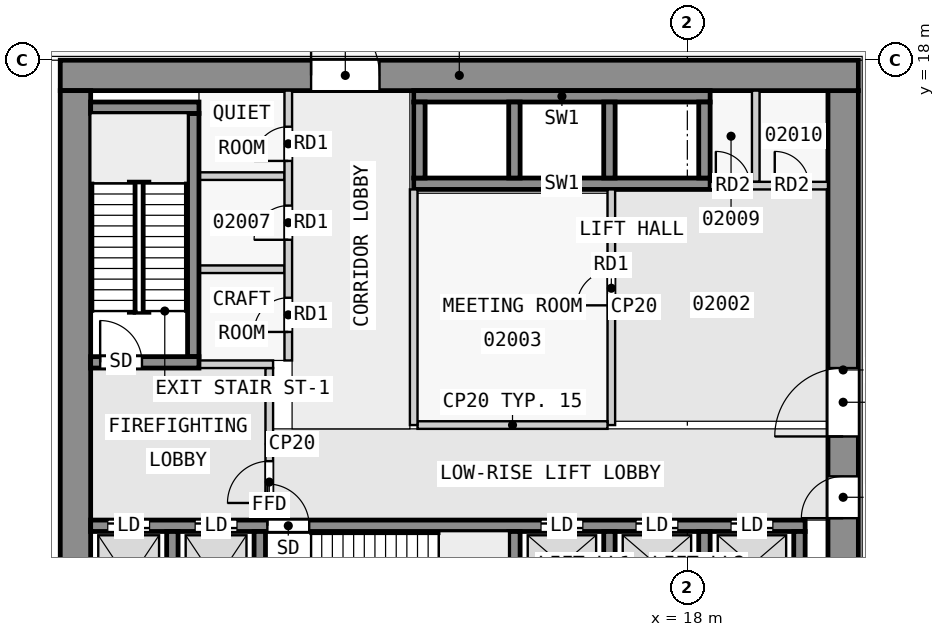
"""IFC4 building model, lengths in metres.
Left out: names, types, materials, properties, quantities, classifications, styles, units other than length and angle.
Written with IfcOpenShell. Run it as: python <this file> out.ifc"""

import sys

from ifc_helpers import new_model, si_unit, direction, frame, frame_2d, origin, place, context, subcontext, project, spatial, rectangle, extrude, element, fill, save


model = new_model("IFC4")
c1 = context("Model", 3, precision=1e-05, world=origin(), true_north=direction((0.0, 1.0)))
c2 = subcontext(c1, "Body", "Model", "MODEL_VIEW")
j1 = project(units=[si_unit("LENGTHUNIT", "METRE"), si_unit("PLANEANGLEUNIT", "RADIAN")], contexts=[c1])
p1 = place(None, origin())
s1 = spatial("IfcSite", under=j1, at=p1, CompositionType="ELEMENT")
p2 = place(p1, origin())
s2 = spatial("IfcBuilding", under=s1, at=p2, CompositionType="ELEMENT")
p3 = place(p2, frame((0.0, 0.0, 12.8)))
s3 = spatial("IfcBuildingStorey", under=s2, at=p3, CompositionType="ELEMENT", Elevation=12.8)
p4 = place(p3, frame((1.5, 17.6, 0.0), z_axis=(0.0, 0.0, 1.0), x_axis=(1.0, 0.0, 0.0)))
e1 = element("IfcWall", 1, at=p4, inside=s3, PredefinedType="SHEAR", context=c2, shape_type="SweptSolid", body=[
    extrude(rectangle(XDim=21.0, YDim=0.8, at=frame_2d((10.5, 0.0))), origin(), (0.0, 0.0, 1.0), 4.15),
])
p5 = place(p4, frame((6.6, 0.0, 0.0)))
e2 = element("IfcOpeningElement", 2, at=p5, cuts=e1, PredefinedType="OPENING", context=c2, shape_type="SweptSolid", body=[
    extrude(rectangle(XDim=1.8, YDim=2.1, at=frame_2d((0.9, 1.05))), frame((0.0, 0.41, 0.0), z_axis=(0.0, -1.0, 0.0), x_axis=(1.0, 0.0, 0.0)), (0.0, 0.0, 1.0), 0.82),
])
p6 = place(p3, frame((1.9, 2.5, 0.0), z_axis=(0.0, 0.0, 1.0), x_axis=(0.0, 1.0, 0.0)))
e3 = element("IfcWall", 3, at=p6, inside=s3, PredefinedType="SHEAR", context=c2, shape_type="SweptSolid", body=[
    extrude(rectangle(XDim=14.7, YDim=0.8, at=frame_2d((7.35, 0.0))), origin(), (0.0, 0.0, 1.0), 4.15),
])
p7 = place(p3, frame((22.1, 2.5, 0.0), z_axis=(0.0, 0.0, 1.0), x_axis=(0.0, 1.0, 0.0)))
e4 = element("IfcWall", 4, at=p7, inside=s3, PredefinedType="SHEAR", context=c2, shape_type="SweptSolid", body=[
    extrude(rectangle(XDim=14.7, YDim=0.8, at=frame_2d((7.35, 0.0))), origin(), (0.0, 0.0, 1.0), 4.15),
])
p8 = place(p7, frame((5.6, 0.0, 0.0)))
e5 = element("IfcOpeningElement", 5, at=p8, cuts=e4, PredefinedType="OPENING", context=c2, shape_type="SweptSolid", body=[
    extrude(rectangle(XDim=1.8, YDim=2.1, at=frame_2d((0.9, 1.05))), frame((0.0, 0.41, 0.0), z_axis=(0.0, -1.0, 0.0), x_axis=(1.0, 0.0, 0.0)), (0.0, 0.0, 1.0), 0.82),
])
p9 = place(p7, frame((3.45, 0.0, 0.0)))
e6 = element("IfcOpeningElement", 6, at=p9, cuts=e4, PredefinedType="OPENING", context=c2, shape_type="SweptSolid", body=[
    extrude(rectangle(XDim=1.1, YDim=2.1, at=frame_2d((0.55, 1.05))), frame((0.0, 0.41, 0.0), z_axis=(0.0, -1.0, 0.0), x_axis=(1.0, 0.0, 0.0)), (0.0, 0.0, 1.0), 0.82),
])
for number, where, z_axis, x_axis in (
    (7, (4.45, 2.8, 0.0), (0.0, 0.0, 1.0), (0.0, 1.0, 0.0)),
    (8, (6.75, 2.8, 0.0), (0.0, 0.0, 1.0), (0.0, 1.0, 0.0)),
    (9, (13.45, 2.8, 0.0), (0.0, 0.0, 1.0), (0.0, 1.0, 0.0)),
    (10, (15.95, 2.8, 0.0), (0.0, 0.0, 1.0), (0.0, 1.0, 0.0)),
    (11, (18.45, 2.8, 0.0), (0.0, 0.0, 1.0), (0.0, 1.0, 0.0)),
    (12, (20.95, 2.8, 0.0), (0.0, 0.0, 1.0), (0.0, 1.0, 0.0)),
):
    element("IfcWall", number, at=place(p3, frame(where, z_axis=z_axis, x_axis=x_axis)), inside=s3, PredefinedType="SHEAR", context=c2, shape_type="SweptSolid", body=[
        extrude(rectangle(XDim=2.8, YDim=0.3, at=frame_2d((1.4, 0.0))), origin(), (0.0, 0.0, 1.0), 4.15),
    ])
p10 = place(p3, frame((2.3, 5.75, 0.0), z_axis=(0.0, 0.0, 1.0), x_axis=(1.0, 0.0, 0.0)))
e13 = element("IfcWall", 13, at=p10, inside=s3, PredefinedType="SHEAR", context=c2, shape_type="SweptSolid", body=[
    extrude(rectangle(XDim=18.8, YDim=0.3, at=frame_2d((9.4, 0.0))), origin(), (0.0, 0.0, 1.0), 4.15),
])
p11 = place(p10, frame((4.65, 0.0, 0.0)))
e14 = element("IfcOpeningElement", 14, at=p11, cuts=e13, PredefinedType="OPENING", context=c2, shape_type="SweptSolid", body=[
    extrude(rectangle(XDim=1.1, YDim=2.1, at=frame_2d((0.55, 1.05))), frame((0.0, 0.16, 0.0), z_axis=(0.0, -1.0, 0.0), x_axis=(1.0, 0.0, 0.0)), (0.0, 0.0, 1.0), 0.32),
])
p12 = place(p10, frame((0.45, 0.0, 0.0)))
e15 = element("IfcOpeningElement", 15, at=p12, cuts=e13, PredefinedType="OPENING", context=c2, shape_type="SweptSolid", body=[
    extrude(rectangle(XDim=1.1, YDim=2.1, at=frame_2d((0.55, 1.05))), frame((0.0, 0.16, 0.0), z_axis=(0.0, -1.0, 0.0), x_axis=(1.0, 0.0, 0.0)), (0.0, 0.0, 1.0), 0.32),
])
p13 = place(p10, frame((2.75, 0.0, 0.0)))
e16 = element("IfcOpeningElement", 16, at=p13, cuts=e13, PredefinedType="OPENING", context=c2, shape_type="SweptSolid", body=[
    extrude(rectangle(XDim=1.1, YDim=2.1, at=frame_2d((0.55, 1.05))), frame((0.0, 0.16, 0.0), z_axis=(0.0, -1.0, 0.0), x_axis=(1.0, 0.0, 0.0)), (0.0, 0.0, 1.0), 0.32),
])
p14 = place(p10, frame((11.85, 0.0, 0.0)))
e17 = element("IfcOpeningElement", 17, at=p14, cuts=e13, PredefinedType="OPENING", context=c2, shape_type="SweptSolid", body=[
    extrude(rectangle(XDim=1.1, YDim=2.1, at=frame_2d((0.55, 1.05))), frame((0.0, 0.16, 0.0), z_axis=(0.0, -1.0, 0.0), x_axis=(1.0, 0.0, 0.0)), (0.0, 0.0, 1.0), 0.32),
])
p15 = place(p10, frame((14.35, 0.0, 0.0)))
e18 = element("IfcOpeningElement", 18, at=p15, cuts=e13, PredefinedType="OPENING", context=c2, shape_type="SweptSolid", body=[
    extrude(rectangle(XDim=1.1, YDim=2.1, at=frame_2d((0.55, 1.05))), frame((0.0, 0.16, 0.0), z_axis=(0.0, -1.0, 0.0), x_axis=(1.0, 0.0, 0.0)), (0.0, 0.0, 1.0), 0.32),
])
p16 = place(p10, frame((16.85, 0.0, 0.0)))
e19 = element("IfcOpeningElement", 19, at=p16, cuts=e13, PredefinedType="OPENING", context=c2, shape_type="SweptSolid", body=[
    extrude(rectangle(XDim=1.1, YDim=2.1, at=frame_2d((0.55, 1.05))), frame((0.0, 0.16, 0.0), z_axis=(0.0, -1.0, 0.0), x_axis=(1.0, 0.0, 0.0)), (0.0, 0.0, 1.0), 0.32),
])
p17 = place(p3, frame((2.3, 10.05, 0.0), z_axis=(0.0, 0.0, 1.0), x_axis=(1.0, 0.0, 0.0)))
e20 = element("IfcWall", 20, at=p17, inside=s3, PredefinedType="SHEAR", context=c2, shape_type="SweptSolid", body=[
    extrude(rectangle(XDim=2.85, YDim=0.3, at=frame_2d((1.425, 0.0))), origin(), (0.0, 0.0, 1.0), 4.15),
])
p18 = place(p17, frame((0.25, 0.0, 0.0)))
e21 = element("IfcOpeningElement", 21, at=p18, cuts=e20, PredefinedType="OPENING", context=c2, shape_type="SweptSolid", body=[
    extrude(rectangle(XDim=1.1, YDim=2.1, at=frame_2d((0.55, 1.05))), frame((0.0, 0.16, 0.0), z_axis=(0.0, -1.0, 0.0), x_axis=(1.0, 0.0, 0.0)), (0.0, 0.0, 1.0), 0.32),
])
p19 = place(p3, frame((5.0, 10.2, 0.0), z_axis=(0.0, 0.0, 1.0), x_axis=(0.0, 1.0, 0.0)))
e22 = element("IfcWall", 22, at=p19, inside=s3, PredefinedType="SHEAR", context=c2, shape_type="SweptSolid", body=[
    extrude(rectangle(XDim=6.4, YDim=0.3, at=frame_2d((3.2, 0.0))), origin(), (0.0, 0.0, 1.0), 4.15),
])
p20 = place(p3, frame((2.3, 16.75, 0.0), z_axis=(0.0, 0.0, 1.0), x_axis=(1.0, 0.0, 0.0)))
e23 = element("IfcWall", 23, at=p20, inside=s3, PredefinedType="SHEAR", context=c2, shape_type="SweptSolid", body=[
    extrude(rectangle(XDim=2.85, YDim=0.3, at=frame_2d((1.425, 0.0))), origin(), (0.0, 0.0, 1.0), 4.15),
])
for number, where, z_axis, x_axis in (
    (24, (10.8, 17.05, 0.0), (0.0, 0.0, 1.0), (1.0, 0.0, 0.0)),
    (25, (10.8, 14.75, 0.0), (0.0, 0.0, 1.0), (1.0, 0.0, 0.0)),
):
    element("IfcWall", number, at=place(p3, frame(where, z_axis=z_axis, x_axis=x_axis)), inside=s3, PredefinedType="SHEAR", context=c2, shape_type="SweptSolid", body=[
        extrude(rectangle(XDim=7.8, YDim=0.3, at=frame_2d((3.9, 0.0))), origin(), (0.0, 0.0, 1.0), 4.15),
    ])
for number, where, z_axis, x_axis in (
    (26, (10.95, 14.9, 0.0), (0.0, 0.0, 1.0), (0.0, 1.0, 0.0)),
    (27, (13.45, 14.9, 0.0), (0.0, 0.0, 1.0), (0.0, 1.0, 0.0)),
    (28, (15.95, 14.9, 0.0), (0.0, 0.0, 1.0), (0.0, 1.0, 0.0)),
    (29, (18.45, 14.9, 0.0), (0.0, 0.0, 1.0), (0.0, 1.0, 0.0)),
):
    element("IfcWall", number, at=place(p3, frame(where, z_axis=z_axis, x_axis=x_axis)), inside=s3, PredefinedType="SHEAR", context=c2, shape_type="SweptSolid", body=[
        extrude(rectangle(XDim=2.0, YDim=0.3, at=frame_2d((1.0, 0.0))), origin(), (0.0, 0.0, 1.0), 4.15),
    ])
p21 = place(p3, frame((7.0, 5.9, 0.0), z_axis=(0.0, 0.0, 1.0), x_axis=(0.0, 1.0, 0.0)))
e30 = element("IfcWall", 30, at=p21, inside=s3, PredefinedType="PARTITIONING", context=c2, shape_type="SweptSolid", body=[
    extrude(rectangle(XDim=4.0, YDim=0.2, at=frame_2d((2.0, 0.0))), origin(), (0.0, 0.0, 1.0), 4.15),
])
p22 = place(p21, frame((0.45, 0.0, 0.0)))
e31 = element("IfcOpeningElement", 31, at=p22, cuts=e30, PredefinedType="OPENING", context=c2, shape_type="SweptSolid", body=[
    extrude(rectangle(XDim=1.1, YDim=2.1, at=frame_2d((0.55, 1.05))), frame((0.0, 0.11, 0.0), z_axis=(0.0, -1.0, 0.0), x_axis=(1.0, 0.0, 0.0)), (0.0, 0.0, 1.0), 0.22),
])
p23 = place(p3, frame((5.15, 10.0, 0.0), z_axis=(0.0, 0.0, 1.0), x_axis=(1.0, 0.0, 0.0)))
e32 = element("IfcWall", 32, at=p23, inside=s3, PredefinedType="PARTITIONING", context=c2, shape_type="SweptSolid", body=[
    extrude(rectangle(XDim=1.95, YDim=0.2, at=frame_2d((0.975, 0.0))), origin(), (0.0, 0.0, 1.0), 4.15),
])
p24 = place(p3, frame((10.8, 8.4, 0.0), z_axis=(0.0, 0.0, 1.0), x_axis=(0.0, 1.0, 0.0)))
e33 = element("IfcWall", 33, at=p24, inside=s3, PredefinedType="PARTITIONING", context=c2, shape_type="SweptSolid", body=[
    extrude(rectangle(XDim=6.2, YDim=0.2, at=frame_2d((3.1, 0.0))), origin(), (0.0, 0.0, 1.0), 4.15),
])
p25 = place(p3, frame((10.9, 8.4, 0.0), z_axis=(0.0, 0.0, 1.0), x_axis=(1.0, 0.0, 0.0)))
e34 = element("IfcWall", 34, at=p25, inside=s3, PredefinedType="PARTITIONING", context=c2, shape_type="SweptSolid", body=[
    extrude(rectangle(XDim=5.0, YDim=0.2, at=frame_2d((2.5, 0.0))), origin(), (0.0, 0.0, 1.0), 4.15),
])
p26 = place(p3, frame((16.0, 8.4, 0.0), z_axis=(0.0, 0.0, 1.0), x_axis=(0.0, 1.0, 0.0)))
e35 = element("IfcWall", 35, at=p26, inside=s3, PredefinedType="PARTITIONING", context=c2, shape_type="SweptSolid", body=[
    extrude(rectangle(XDim=6.2, YDim=0.2, at=frame_2d((3.1, 0.0))), origin(), (0.0, 0.0, 1.0), 4.15),
])
p27 = place(p26, frame((3.15, 0.0, 0.0)))
e36 = element("IfcOpeningElement", 36, at=p27, cuts=e35, PredefinedType="OPENING", context=c2, shape_type="SweptSolid", body=[
    extrude(rectangle(XDim=0.9, YDim=2.1, at=frame_2d((0.45, 1.05))), frame((0.0, 0.11, 0.0), z_axis=(0.0, -1.0, 0.0), x_axis=(1.0, 0.0, 0.0)), (0.0, 0.0, 1.0), 0.22),
])
p28 = place(p3, frame((7.5, 10.1, 0.0), z_axis=(0.0, 0.0, 1.0), x_axis=(0.0, 1.0, 0.0)))
e37 = element("IfcWall", 37, at=p28, inside=s3, PredefinedType="PARTITIONING", context=c2, shape_type="SweptSolid", body=[
    extrude(rectangle(XDim=7.1, YDim=0.2, at=frame_2d((3.55, 0.0))), origin(), (0.0, 0.0, 1.0), 4.15),
])
p29 = place(p28, frame((0.75, 0.0, 0.0)))
e38 = element("IfcOpeningElement", 38, at=p29, cuts=e37, PredefinedType="OPENING", context=c2, shape_type="SweptSolid", body=[
    extrude(rectangle(XDim=0.9, YDim=2.1, at=frame_2d((0.45, 1.05))), frame((0.0, 0.11, 0.0), z_axis=(0.0, -1.0, 0.0), x_axis=(1.0, 0.0, 0.0)), (0.0, 0.0, 1.0), 0.22),
])
p30 = place(p28, frame((3.175, 0.0, 0.0)))
e39 = element("IfcOpeningElement", 39, at=p30, cuts=e37, PredefinedType="OPENING", context=c2, shape_type="SweptSolid", body=[
    extrude(rectangle(XDim=0.9, YDim=2.1, at=frame_2d((0.45, 1.05))), frame((0.0, 0.11, 0.0), z_axis=(0.0, -1.0, 0.0), x_axis=(1.0, 0.0, 0.0)), (0.0, 0.0, 1.0), 0.22),
])
p31 = place(p28, frame((5.25, 0.0, 0.0)))
e40 = element("IfcOpeningElement", 40, at=p31, cuts=e37, PredefinedType="OPENING", context=c2, shape_type="SweptSolid", body=[
    extrude(rectangle(XDim=0.9, YDim=2.1, at=frame_2d((0.45, 1.05))), frame((0.0, 0.11, 0.0), z_axis=(0.0, -1.0, 0.0), x_axis=(1.0, 0.0, 0.0)), (0.0, 0.0, 1.0), 0.22),
])
for number, where, z_axis, x_axis in (
    (41, (5.15, 12.5, 0.0), (0.0, 0.0, 1.0), (1.0, 0.0, 0.0)),
    (42, (5.15, 14.95, 0.0), (0.0, 0.0, 1.0), (1.0, 0.0, 0.0)),
):
    element("IfcWall", number, at=place(p3, frame(where, z_axis=z_axis, x_axis=x_axis)), inside=s3, PredefinedType="PARTITIONING", context=c2, shape_type="SweptSolid", body=[
        extrude(rectangle(XDim=2.25, YDim=0.2, at=frame_2d((1.125, 0.0))), origin(), (0.0, 0.0, 1.0), 4.15),
    ])
p32 = place(p3, frame((18.6, 14.7, 0.0), z_axis=(0.0, 0.0, 1.0), x_axis=(1.0, 0.0, 0.0)))
e43 = element("IfcWall", 43, at=p32, inside=s3, PredefinedType="PARTITIONING", context=c2, shape_type="SweptSolid", body=[
    extrude(rectangle(XDim=3.1, YDim=0.2, at=frame_2d((1.55, 0.0))), origin(), (0.0, 0.0, 1.0), 4.15),
])
p33 = place(p32, frame((0.15, 0.0, 0.0)))
e44 = element("IfcOpeningElement", 44, at=p33, cuts=e43, PredefinedType="OPENING", context=c2, shape_type="SweptSolid", body=[
    extrude(rectangle(XDim=0.9, YDim=2.1, at=frame_2d((0.45, 1.05))), frame((0.0, 0.11, 0.0), z_axis=(0.0, -1.0, 0.0), x_axis=(1.0, 0.0, 0.0)), (0.0, 0.0, 1.0), 0.22),
])
p34 = place(p32, frame((1.7, 0.0, 0.0)))
e45 = element("IfcOpeningElement", 45, at=p34, cuts=e43, PredefinedType="OPENING", context=c2, shape_type="SweptSolid", body=[
    extrude(rectangle(XDim=0.9, YDim=2.1, at=frame_2d((0.45, 1.05))), frame((0.0, 0.11, 0.0), z_axis=(0.0, -1.0, 0.0), x_axis=(1.0, 0.0, 0.0)), (0.0, 0.0, 1.0), 0.22),
])
p35 = place(p3, frame((19.8, 14.8, 0.0), z_axis=(0.0, 0.0, 1.0), x_axis=(0.0, 1.0, 0.0)))
e46 = element("IfcWall", 46, at=p35, inside=s3, PredefinedType="PARTITIONING", context=c2, shape_type="SweptSolid", body=[
    extrude(rectangle(XDim=2.4, YDim=0.2, at=frame_2d((1.2, 0.0))), origin(), (0.0, 0.0, 1.0), 4.15),
])
p36 = place(p22, origin())
e47 = element("IfcDoor", 47, at=p36, inside=s3, OperationType="SINGLE_SWING_LEFT", PredefinedType="DOOR", context=c2, shape_type="SweptSolid", body=[
    extrude(rectangle(XDim=1.1, YDim=2.1, at=frame_2d((0.55, 1.05))), frame((0.0, 0.025, 0.0), z_axis=(0.0, -1.0, 0.0), x_axis=(1.0, 0.0, 0.0)), (0.0, 0.0, 1.0), 0.05),
])
fill(e31, e47)
p37 = place(p18, origin())
e48 = element("IfcDoor", 48, at=p37, inside=s3, OperationType="SINGLE_SWING_RIGHT", PredefinedType="DOOR", context=c2, shape_type="SweptSolid", body=[
    extrude(rectangle(XDim=1.1, YDim=2.1, at=frame_2d((0.55, 1.05))), frame((0.0, 0.025, 0.0), z_axis=(0.0, -1.0, 0.0), x_axis=(1.0, 0.0, 0.0)), (0.0, 0.0, 1.0), 0.05),
])
fill(e21, e48)
p38 = place(p27, origin())
e49 = element("IfcDoor", 49, at=p38, inside=s3, OperationType="SINGLE_SWING_LEFT", PredefinedType="DOOR", context=c2, shape_type="SweptSolid", body=[
    extrude(rectangle(XDim=0.9, YDim=2.1, at=frame_2d((0.45, 1.05))), frame((0.0, 0.025, 0.0), z_axis=(0.0, -1.0, 0.0), x_axis=(1.0, 0.0, 0.0)), (0.0, 0.0, 1.0), 0.05),
])
fill(e36, e49)
p39 = place(p11, origin())
e50 = element("IfcDoor", 50, at=p39, inside=s3, OperationType="SINGLE_SWING_LEFT", PredefinedType="DOOR", context=c2, shape_type="SweptSolid", body=[
    extrude(rectangle(XDim=1.1, YDim=2.1, at=frame_2d((0.55, 1.05))), frame((0.0, 0.025, 0.0), z_axis=(0.0, -1.0, 0.0), x_axis=(1.0, 0.0, 0.0)), (0.0, 0.0, 1.0), 0.05),
])
fill(e14, e50)
p40 = place(p12, origin())
e51 = element("IfcDoor", 51, at=p40, inside=s3, OperationType="DOUBLE_DOOR_SLIDING", PredefinedType="DOOR", context=c2, shape_type="SweptSolid", body=[
    extrude(rectangle(XDim=1.1, YDim=2.1, at=frame_2d((0.55, 1.05))), frame((0.0, 0.025, 0.0), z_axis=(0.0, -1.0, 0.0), x_axis=(1.0, 0.0, 0.0)), (0.0, 0.0, 1.0), 0.05),
])
fill(e15, e51)
p41 = place(p13, origin())
e52 = element("IfcDoor", 52, at=p41, inside=s3, OperationType="DOUBLE_DOOR_SLIDING", PredefinedType="DOOR", context=c2, shape_type="SweptSolid", body=[
    extrude(rectangle(XDim=1.1, YDim=2.1, at=frame_2d((0.55, 1.05))), frame((0.0, 0.025, 0.0), z_axis=(0.0, -1.0, 0.0), x_axis=(1.0, 0.0, 0.0)), (0.0, 0.0, 1.0), 0.05),
])
fill(e16, e52)
p42 = place(p14, origin())
e53 = element("IfcDoor", 53, at=p42, inside=s3, OperationType="DOUBLE_DOOR_SLIDING", PredefinedType="DOOR", context=c2, shape_type="SweptSolid", body=[
    extrude(rectangle(XDim=1.1, YDim=2.1, at=frame_2d((0.55, 1.05))), frame((0.0, 0.025, 0.0), z_axis=(0.0, -1.0, 0.0), x_axis=(1.0, 0.0, 0.0)), (0.0, 0.0, 1.0), 0.05),
])
fill(e17, e53)
p43 = place(p15, origin())
e54 = element("IfcDoor", 54, at=p43, inside=s3, OperationType="DOUBLE_DOOR_SLIDING", PredefinedType="DOOR", context=c2, shape_type="SweptSolid", body=[
    extrude(rectangle(XDim=1.1, YDim=2.1, at=frame_2d((0.55, 1.05))), frame((0.0, 0.025, 0.0), z_axis=(0.0, -1.0, 0.0), x_axis=(1.0, 0.0, 0.0)), (0.0, 0.0, 1.0), 0.05),
])
fill(e18, e54)
p44 = place(p16, origin())
e55 = element("IfcDoor", 55, at=p44, inside=s3, OperationType="DOUBLE_DOOR_SLIDING", PredefinedType="DOOR", context=c2, shape_type="SweptSolid", body=[
    extrude(rectangle(XDim=1.1, YDim=2.1, at=frame_2d((0.55, 1.05))), frame((0.0, 0.025, 0.0), z_axis=(0.0, -1.0, 0.0), x_axis=(1.0, 0.0, 0.0)), (0.0, 0.0, 1.0), 0.05),
])
fill(e19, e55)
p45 = place(p8, origin())
e56 = element("IfcDoor", 56, at=p45, inside=s3, OperationType="DOUBLE_DOOR_SINGLE_SWING", PredefinedType="DOOR", context=c2, shape_type="SweptSolid", body=[
    extrude(rectangle(XDim=1.8, YDim=2.1, at=frame_2d((0.9, 1.05))), frame((0.0, 0.025, 0.0), z_axis=(0.0, -1.0, 0.0), x_axis=(1.0, 0.0, 0.0)), (0.0, 0.0, 1.0), 0.05),
])
fill(e5, e56)
p46 = place(p9, origin())
e57 = element("IfcDoor", 57, at=p46, inside=s3, OperationType="SINGLE_SWING_RIGHT", PredefinedType="DOOR", context=c2, shape_type="SweptSolid", body=[
    extrude(rectangle(XDim=1.1, YDim=2.1, at=frame_2d((0.55, 1.05))), frame((0.0, 0.025, 0.0), z_axis=(0.0, -1.0, 0.0), x_axis=(1.0, 0.0, 0.0)), (0.0, 0.0, 1.0), 0.05),
])
fill(e6, e57)
p47 = place(p5, origin())
e58 = element("IfcDoor", 58, at=p47, inside=s3, OperationType="DOUBLE_DOOR_SINGLE_SWING", PredefinedType="DOOR", context=c2, shape_type="SweptSolid", body=[
    extrude(rectangle(XDim=1.8, YDim=2.1, at=frame_2d((0.9, 1.05))), frame((0.0, 0.025, 0.0), z_axis=(0.0, -1.0, 0.0), x_axis=(1.0, 0.0, 0.0)), (0.0, 0.0, 1.0), 0.05),
])
fill(e2, e58)
p48 = place(p29, origin())
e59 = element("IfcDoor", 59, at=p48, inside=s3, OperationType="SINGLE_SWING_RIGHT", PredefinedType="DOOR", context=c2, shape_type="SweptSolid", body=[
    extrude(rectangle(XDim=0.9, YDim=2.1, at=frame_2d((0.45, 1.05))), frame((0.0, 0.025, 0.0), z_axis=(0.0, -1.0, 0.0), x_axis=(1.0, 0.0, 0.0)), (0.0, 0.0, 1.0), 0.05),
])
fill(e38, e59)
p49 = place(p30, origin())
e60 = element("IfcDoor", 60, at=p49, inside=s3, OperationType="SINGLE_SWING_RIGHT", PredefinedType="DOOR", context=c2, shape_type="SweptSolid", body=[
    extrude(rectangle(XDim=0.9, YDim=2.1, at=frame_2d((0.45, 1.05))), frame((0.0, 0.025, 0.0), z_axis=(0.0, -1.0, 0.0), x_axis=(1.0, 0.0, 0.0)), (0.0, 0.0, 1.0), 0.05),
])
fill(e39, e60)
p50 = place(p31, origin())
e61 = element("IfcDoor", 61, at=p50, inside=s3, OperationType="SINGLE_SWING_RIGHT", PredefinedType="DOOR", context=c2, shape_type="SweptSolid", body=[
    extrude(rectangle(XDim=0.9, YDim=2.1, at=frame_2d((0.45, 1.05))), frame((0.0, 0.025, 0.0), z_axis=(0.0, -1.0, 0.0), x_axis=(1.0, 0.0, 0.0)), (0.0, 0.0, 1.0), 0.05),
])
fill(e40, e61)
p51 = place(p33, origin())
e62 = element("IfcDoor", 62, at=p51, inside=s3, OperationType="SINGLE_SWING_LEFT", PredefinedType="DOOR", context=c2, shape_type="SweptSolid", body=[
    extrude(rectangle(XDim=0.9, YDim=2.1, at=frame_2d((0.45, 1.05))), frame((0.0, 0.025, 0.0), z_axis=(0.0, -1.0, 0.0), x_axis=(1.0, 0.0, 0.0)), (0.0, 0.0, 1.0), 0.05),
])
fill(e44, e62)
p52 = place(p34, origin())
e63 = element("IfcDoor", 63, at=p52, inside=s3, OperationType="SINGLE_SWING_LEFT", PredefinedType="DOOR", context=c2, shape_type="SweptSolid", body=[
    extrude(rectangle(XDim=0.9, YDim=2.1, at=frame_2d((0.45, 1.05))), frame((0.0, 0.025, 0.0), z_axis=(0.0, -1.0, 0.0), x_axis=(1.0, 0.0, 0.0)), (0.0, 0.0, 1.0), 0.05),
])
fill(e45, e63)
save(model, sys.argv[1])
